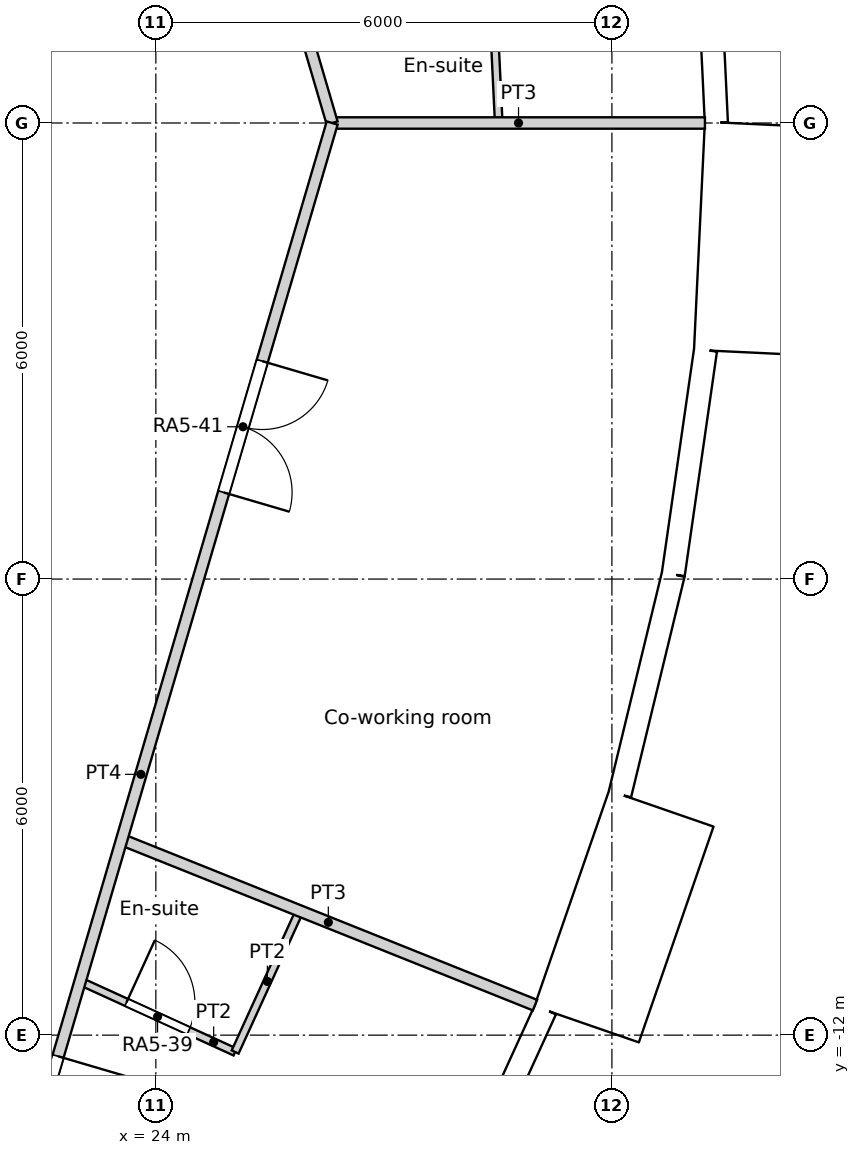
"""IFC4 building model, lengths in metres.
Left out: names, types, materials, properties, quantities, classifications, styles, units other than length and angle.
Written with IfcOpenShell. Run it as: python <this file> out.ifc"""

import sys

from ifc_helpers import new_model, si_unit, direction, frame, frame_2d, origin, origin_2d, place, context, subcontext, project, spatial, rectangle, circle, extrude, element, fill, save


model = new_model("IFC4")
c1 = context("Model", 3, precision=1e-05, world=origin(), true_north=direction((0.0, 1.0)))
c2 = subcontext(c1, "Body", "Model", "MODEL_VIEW")
j1 = project(units=[si_unit("LENGTHUNIT", "METRE"), si_unit("PLANEANGLEUNIT", "RADIAN")], contexts=[c1])
p1 = place(None, origin())
s1 = spatial("IfcSite", under=j1, at=p1, CompositionType="ELEMENT")
p2 = place(p1, origin())
s2 = spatial("IfcBuilding", under=s1, at=p2, CompositionType="ELEMENT")
p3 = place(p2, frame((0.0, 0.0, 71.4)))
s3 = spatial("IfcBuildingStorey", under=s2, at=p3, CompositionType="ELEMENT", Elevation=71.4)
for number, where, z_axis, x_axis in (
    (1, (30.275, 0.0, 0.0), (0.0, 0.0, 1.0), (1.0, 0.0, 0.0)),
    (2, (28.106, -11.252, 0.0), (0.0, 0.0, 1.0), (1.0, 0.0, 0.0)),
    (3, (29.728, -5.729, 0.0), (0.0, 0.0, 1.0), (1.0, 0.0, 0.0)),
):
    element("IfcColumn", number, at=place(p3, frame(where, z_axis=z_axis, x_axis=x_axis)), inside=s3, PredefinedType="COLUMN", context=c2, shape_type="SweptSolid", body=[
        extrude(circle(Radius=0.6, at=origin_2d()), origin(), (0.0, 0.0, 1.0), 3.6),
    ])
for number, where, z_axis, x_axis in (
    (4, (24.548, 0.0, 0.0), (0.0, 0.0, 1.0), (1.0, 0.0, 0.0)),
    (5, (23.886, -5.661, 0.0), (0.0, 0.0, 1.0), (1.0, 0.0, 0.0)),
):
    element("IfcColumn", number, at=place(p3, frame(where, z_axis=z_axis, x_axis=x_axis)), inside=s3, PredefinedType="COLUMN", context=c2, shape_type="SweptSolid", body=[
        extrude(circle(Radius=0.65, at=origin_2d()), origin(), (0.0, 0.0, 1.0), 3.6),
    ])
p4 = place(p3, frame((31.374, 0.006, 0.0), z_axis=(0.0, 0.0, 1.0), x_axis=(-0.047522328113, 0.998870175914, 0.0)))
e6 = element("IfcWall", 6, at=p4, inside=s3, PredefinedType="SOLIDWALL", context=c2, shape_type="SweptSolid", body=[
    extrude(rectangle(XDim=2.98, YDim=0.3, at=frame_2d((1.49, 0.0))), origin(), (0.0, 0.0, 1.0), 3.15),
])
p5 = place(p4, frame((1.49, 0.0, 1.55)))
e7 = element("IfcOpeningElement", 7, at=p5, cuts=e6, PredefinedType="OPENING", context=c2, shape_type="SweptSolid", body=[
    extrude(circle(Radius=0.9, at=origin_2d()), frame((0.0, 0.16, 0.0), z_axis=(0.0, -1.0, 0.0), x_axis=(1.0, 0.0, 0.0)), (0.0, 0.0, 1.0), 0.32),
])
p6 = place(p3, frame((27.887, -14.377, 0.0), z_axis=(0.0, 0.0, 1.0), x_axis=(0.415407317162, 0.909635509888, 0.0)))
e8 = element("IfcWall", 8, at=p6, inside=s3, PredefinedType="SOLIDWALL", context=c2, shape_type="SweptSolid", body=[
    extrude(rectangle(XDim=2.98, YDim=0.3, at=frame_2d((1.49, 0.0))), origin(), (0.0, 0.0, 1.0), 3.15),
])
p7 = place(p6, frame((1.49, 0.0, 1.55)))
e9 = element("IfcOpeningElement", 9, at=p7, cuts=e8, PredefinedType="OPENING", context=c2, shape_type="SweptSolid", body=[
    extrude(circle(Radius=0.9, at=origin_2d()), frame((0.0, 0.16, 0.0), z_axis=(0.0, -1.0, 0.0), x_axis=(1.0, 0.0, 0.0)), (0.0, 0.0, 1.0), 0.32),
])
p8 = place(p3, frame((29.668, -11.855, -0.45), z_axis=(0.0, 0.0, 1.0), x_axis=(0.327071431777, 0.944999618262, 0.0)))
e10 = element("IfcWall", 10, at=p8, inside=s3, PredefinedType="ELEMENTEDWALL", context=c2, shape_type="SweptSolid", body=[
    extrude(rectangle(XDim=3.0, YDim=1.45, at=frame_2d((1.5, 0.0))), origin(), (0.0, 0.0, 1.0), 3.6),
])
p9 = place(p8, frame((1.5, 0.0, 2.0)))
e11 = element("IfcOpeningElement", 11, at=p9, cuts=e10, PredefinedType="OPENING", context=c2, shape_type="SweptSolid", body=[
    extrude(circle(Radius=0.9, at=origin_2d()), frame((0.0, 0.735, 0.0), z_axis=(0.0, -1.0, 0.0), x_axis=(1.0, 0.0, 0.0)), (0.0, 0.0, 1.0), 1.47),
])
p10 = place(p3, frame((30.105, -8.833, 0.0), z_axis=(0.0, 0.0, 1.0), x_axis=(0.235743081534, 0.971815414319, 0.0)))
e12 = element("IfcWall", 12, at=p10, inside=s3, PredefinedType="SOLIDWALL", context=c2, shape_type="SweptSolid", body=[
    extrude(rectangle(XDim=2.979, YDim=0.3, at=frame_2d((1.49, 0.0))), origin(), (0.0, 0.0, 1.0), 3.15),
])
p11 = place(p10, frame((1.49, 0.0, 1.55)))
e13 = element("IfcOpeningElement", 13, at=p11, cuts=e12, PredefinedType="OPENING", context=c2, shape_type="SweptSolid", body=[
    extrude(circle(Radius=0.9, at=origin_2d()), frame((0.0, 0.16, 0.0), z_axis=(0.0, -1.0, 0.0), x_axis=(1.0, 0.0, 0.0)), (0.0, 0.0, 1.0), 0.32),
])
p12 = place(p3, frame((30.807, -5.938, 0.0), z_axis=(0.0, 0.0, 1.0), x_axis=(0.142315996627, 0.989821275334, 0.0)))
e14 = element("IfcWall", 14, at=p12, inside=s3, PredefinedType="SOLIDWALL", context=c2, shape_type="SweptSolid", body=[
    extrude(rectangle(XDim=2.98, YDim=0.3, at=frame_2d((1.49, 0.0))), origin(), (0.0, 0.0, 1.0), 3.15),
])
p13 = place(p12, frame((1.49, 0.0, 1.55)))
e15 = element("IfcOpeningElement", 15, at=p13, cuts=e14, PredefinedType="OPENING", context=c2, shape_type="SweptSolid", body=[
    extrude(circle(Radius=0.9, at=origin_2d()), frame((0.0, 0.16, 0.0), z_axis=(0.0, -1.0, 0.0), x_axis=(1.0, 0.0, 0.0)), (0.0, 0.0, 1.0), 0.32),
])
p14 = place(p3, frame((31.806, -3.017, -0.45), z_axis=(0.0, 0.0, 1.0), x_axis=(0.047607680889, 0.998866111509, 0.0)))
e16 = element("IfcWall", 16, at=p14, inside=s3, PredefinedType="ELEMENTEDWALL", context=c2, shape_type="SweptSolid", body=[
    extrude(rectangle(XDim=3.0, YDim=1.45, at=frame_2d((1.5, 0.0))), origin(), (0.0, 0.0, 1.0), 3.6),
])
p15 = place(p14, frame((1.5, 0.0, 2.0)))
e17 = element("IfcOpeningElement", 17, at=p15, cuts=e16, PredefinedType="OPENING", context=c2, shape_type="SweptSolid", body=[
    extrude(circle(Radius=0.9, at=origin_2d()), frame((0.0, 0.735, 0.0), z_axis=(0.0, -1.0, 0.0), x_axis=(1.0, 0.0, 0.0)), (0.0, 0.0, 1.0), 1.47),
])
p16 = place(p3, frame((22.14, 14.229, 0.0), z_axis=(0.0, 0.0, 1.0), x_axis=(0.281780364869, -0.959478934617, 0.0)))
e18 = element("IfcWall", 18, at=p16, inside=s3, PredefinedType="PARTITIONING", context=c2, shape_type="SweptSolid", body=[
    extrude(rectangle(XDim=14.83, YDim=0.15, at=frame_2d((7.415, 0.0))), origin(), (0.0, 0.0, 1.0), 3.15),
])
p17 = place(p16, frame((10.816, 0.0, 0.0)))
e19 = element("IfcOpeningElement", 19, at=p17, cuts=e18, PredefinedType="OPENING", context=c2, shape_type="SweptSolid", body=[
    extrude(rectangle(XDim=1.0, YDim=2.1, at=frame_2d((0.5, 1.05))), frame((0.0, 0.075, 0.0), z_axis=(0.0, -1.0, 0.0), x_axis=(1.0, 0.0, 0.0)), (0.0, 0.0, 1.0), 0.15),
])
p18 = place(p16, frame((5.953, 0.0, 0.0)))
e20 = element("IfcOpeningElement", 20, at=p18, cuts=e18, PredefinedType="OPENING", context=c2, shape_type="SweptSolid", body=[
    extrude(rectangle(XDim=1.0, YDim=2.1, at=frame_2d((0.5, 1.05))), frame((0.0, 0.075, 0.0), z_axis=(0.0, -1.0, 0.0), x_axis=(1.0, 0.0, 0.0)), (0.0, 0.0, 1.0), 0.15),
])
p19 = place(p16, frame((1.033, 0.0, 0.0)))
e21 = element("IfcOpeningElement", 21, at=p19, cuts=e18, PredefinedType="OPENING", context=c2, shape_type="SweptSolid", body=[
    extrude(rectangle(XDim=1.0, YDim=2.1, at=frame_2d((0.5, 1.05))), frame((0.0, 0.075, 0.0), z_axis=(0.0, -1.0, 0.0), x_axis=(1.0, 0.0, 0.0)), (0.0, 0.0, 1.0), 0.15),
])
p20 = place(p3, frame((22.141, -14.229, 0.0), z_axis=(0.0, 0.0, 1.0), x_axis=(0.281765208947, 0.959483385488, 0.0)))
e22 = element("IfcWall", 22, at=p20, inside=s3, PredefinedType="PARTITIONING", context=c2, shape_type="SweptSolid", body=[
    extrude(rectangle(XDim=14.83, YDim=0.15, at=frame_2d((7.415, 0.0))), origin(), (0.0, 0.0, 1.0), 3.15),
])
p21 = place(p20, frame((1.033, 0.0, 0.0)))
e23 = element("IfcOpeningElement", 23, at=p21, cuts=e22, PredefinedType="OPENING", context=c2, shape_type="SweptSolid", body=[
    extrude(rectangle(XDim=1.0, YDim=2.1, at=frame_2d((0.5, 1.05))), frame((0.0, 0.075, 0.0), z_axis=(0.0, -1.0, 0.0), x_axis=(1.0, 0.0, 0.0)), (0.0, 0.0, 1.0), 0.15),
])
p22 = place(p20, frame((9.765, 0.0, 0.0)))
e24 = element("IfcOpeningElement", 24, at=p22, cuts=e22, PredefinedType="OPENING", context=c2, shape_type="SweptSolid", body=[
    extrude(rectangle(XDim=1.8, YDim=2.1, at=frame_2d((0.9, 1.05))), frame((0.0, 0.075, 0.0), z_axis=(0.0, -1.0, 0.0), x_axis=(1.0, 0.0, 0.0)), (0.0, 0.0, 1.0), 0.15),
])
p23 = place(p3, frame((28.412, 2.069, 0.0), z_axis=(0.0, 0.0, 1.0), x_axis=(0.047733138673, -0.998860124078, 0.0)))
e25 = element("IfcWall", 25, at=p23, inside=s3, PredefinedType="PARTITIONING", context=c2, shape_type="SweptSolid", body=[
    extrude(rectangle(XDim=2.072, YDim=0.1, at=frame_2d((1.036, 0.0))), origin(), (0.0, 0.0, 1.0), 3.15),
])
p24 = place(p3, frame((26.319, 0.0, 0.0), z_axis=(0.0, 0.0, 1.0), x_axis=(1.0, 0.0, 0.0)))
e26 = element("IfcWall", 26, at=p24, inside=s3, PredefinedType="PARTITIONING", context=c2, shape_type="SweptSolid", body=[
    extrude(rectangle(XDim=4.905, YDim=0.15, at=frame_2d((2.453, 0.0))), origin(), (0.0, 0.0, 1.0), 3.15),
])
p25 = place(p3, frame((23.003, -11.291, 0.0), z_axis=(0.0, 0.0, 1.0), x_axis=(0.90975773562, -0.41513956988, 0.0)))
e27 = element("IfcWall", 27, at=p25, inside=s3, PredefinedType="PARTITIONING", context=c2, shape_type="SweptSolid", body=[
    extrude(rectangle(XDim=2.242, YDim=0.1, at=frame_2d((1.121, 0.0))), origin(), (0.0, 0.0, 1.0), 3.15),
])
p26 = place(p25, frame((0.671, 0.0, 0.0)))
e28 = element("IfcOpeningElement", 28, at=p26, cuts=e27, PredefinedType="OPENING", context=c2, shape_type="SweptSolid", body=[
    extrude(rectangle(XDim=0.9, YDim=2.04, at=frame_2d((0.45, 1.02))), frame((0.0, 0.05, 0.0), z_axis=(0.0, -1.0, 0.0), x_axis=(1.0, 0.0, 0.0)), (0.0, 0.0, 1.0), 0.1),
])
p27 = place(p3, frame((25.043, -12.222, 0.0), z_axis=(0.0, 0.0, 1.0), x_axis=(0.41546015385, 0.909611378866, 0.0)))
e29 = element("IfcWall", 29, at=p27, inside=s3, PredefinedType="PARTITIONING", context=c2, shape_type="SweptSolid", body=[
    extrude(rectangle(XDim=2.042, YDim=0.1, at=frame_2d((1.021, 0.0))), origin(), (0.0, 0.0, 1.0), 3.15),
])
p28 = place(p3, frame((23.55, -9.428, 0.0), z_axis=(0.0, 0.0, 1.0), x_axis=(0.928355916729, -0.371692469489, 0.0)))
e30 = element("IfcWall", 30, at=p28, inside=s3, PredefinedType="PARTITIONING", context=c2, shape_type="SweptSolid", body=[
    extrude(rectangle(XDim=5.858, YDim=0.15, at=frame_2d((2.929, 0.0))), origin(), (0.0, 0.0, 1.0), 3.15),
])
p29 = place(p5, origin())
e31 = element("IfcWindow", 31, at=p29, inside=s3, PartitioningType="SINGLE_PANEL", PredefinedType="WINDOW", context=c2, shape_type="SweptSolid", body=[
    extrude(circle(Radius=0.9, at=origin_2d()), frame((0.0, 0.12, 0.0), z_axis=(0.0, -1.0, 0.0), x_axis=(1.0, 0.0, 0.0)), (0.0, 0.0, 1.0), 0.1),
])
fill(e7, e31)
p30 = place(p7, origin())
e32 = element("IfcWindow", 32, at=p30, inside=s3, PartitioningType="SINGLE_PANEL", PredefinedType="WINDOW", context=c2, shape_type="SweptSolid", body=[
    extrude(circle(Radius=0.9, at=origin_2d()), frame((0.0, 0.12, 0.0), z_axis=(0.0, -1.0, 0.0), x_axis=(1.0, 0.0, 0.0)), (0.0, 0.0, 1.0), 0.1),
])
fill(e9, e32)
p31 = place(p9, origin())
e33 = element("IfcWindow", 33, at=p31, inside=s3, PartitioningType="SINGLE_PANEL", PredefinedType="WINDOW", context=c2, shape_type="SweptSolid", body=[
    extrude(circle(Radius=0.9, at=origin_2d()), frame((0.0, 0.695, 0.0), z_axis=(0.0, -1.0, 0.0), x_axis=(1.0, 0.0, 0.0)), (0.0, 0.0, 1.0), 0.1),
])
fill(e11, e33)
p32 = place(p11, origin())
e34 = element("IfcWindow", 34, at=p32, inside=s3, PartitioningType="SINGLE_PANEL", PredefinedType="WINDOW", context=c2, shape_type="SweptSolid", body=[
    extrude(circle(Radius=0.9, at=origin_2d()), frame((0.0, 0.12, 0.0), z_axis=(0.0, -1.0, 0.0), x_axis=(1.0, 0.0, 0.0)), (0.0, 0.0, 1.0), 0.1),
])
fill(e13, e34)
p33 = place(p13, origin())
e35 = element("IfcWindow", 35, at=p33, inside=s3, PartitioningType="SINGLE_PANEL", PredefinedType="WINDOW", context=c2, shape_type="SweptSolid", body=[
    extrude(circle(Radius=0.9, at=origin_2d()), frame((0.0, 0.12, 0.0), z_axis=(0.0, -1.0, 0.0), x_axis=(1.0, 0.0, 0.0)), (0.0, 0.0, 1.0), 0.1),
])
fill(e15, e35)
p34 = place(p15, origin())
e36 = element("IfcWindow", 36, at=p34, inside=s3, PartitioningType="SINGLE_PANEL", PredefinedType="WINDOW", context=c2, shape_type="SweptSolid", body=[
    extrude(circle(Radius=0.9, at=origin_2d()), frame((0.0, 0.695, 0.0), z_axis=(0.0, -1.0, 0.0), x_axis=(1.0, 0.0, 0.0)), (0.0, 0.0, 1.0), 0.1),
])
fill(e17, e36)
p35 = place(p26, origin())
e37 = element("IfcDoor", 37, at=p35, inside=s3, OperationType="SINGLE_SWING_LEFT", PredefinedType="DOOR", context=c2, shape_type="SweptSolid", body=[
    extrude(rectangle(XDim=0.9, YDim=2.04, at=frame_2d((0.45, 1.02))), frame((0.0, 0.025, 0.0), z_axis=(0.0, -1.0, 0.0), x_axis=(1.0, 0.0, 0.0)), (0.0, 0.0, 1.0), 0.05),
])
fill(e28, e37)
p36 = place(p21, origin())
e38 = element("IfcDoor", 38, at=p36, inside=s3, OperationType="SINGLE_SWING_LEFT", PredefinedType="DOOR", context=c2, shape_type="SweptSolid", body=[
    extrude(rectangle(XDim=1.0, YDim=2.1, at=frame_2d((0.5, 1.05))), frame((0.0, 0.025, 0.0), z_axis=(0.0, -1.0, 0.0), x_axis=(1.0, 0.0, 0.0)), (0.0, 0.0, 1.0), 0.05),
])
fill(e23, e38)
p37 = place(p22, origin())
e39 = element("IfcDoor", 39, at=p37, inside=s3, OperationType="DOUBLE_DOOR_SINGLE_SWING", PredefinedType="DOOR", context=c2, shape_type="SweptSolid", body=[
    extrude(rectangle(XDim=1.8, YDim=2.1, at=frame_2d((0.9, 1.05))), frame((0.0, 0.025, 0.0), z_axis=(0.0, -1.0, 0.0), x_axis=(1.0, 0.0, 0.0)), (0.0, 0.0, 1.0), 0.05),
])
fill(e24, e39)
save(model, sys.argv[1])
